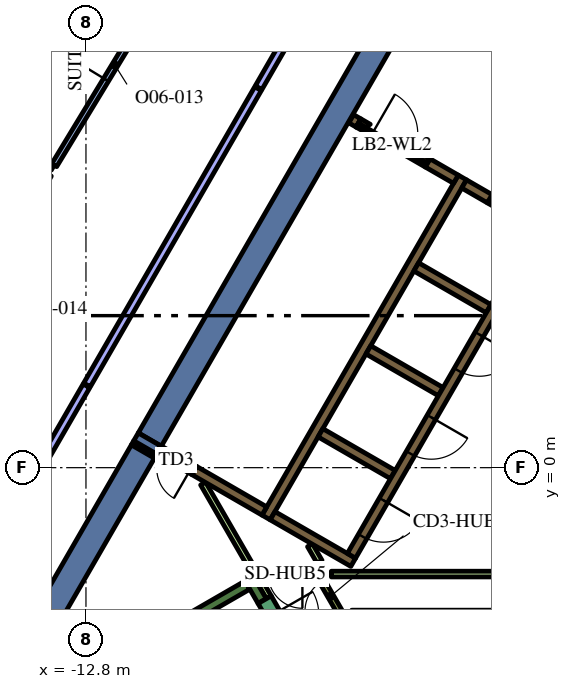
"""IFC4 building model, lengths in metres.
Left out: names, types, materials, properties, quantities, classifications, styles, units other than length and angle.
Written with IfcOpenShell. Run it as: python <this file> out.ifc"""

import sys

from ifc_helpers import new_model, si_unit, direction, frame, frame_2d, origin, place, context, subcontext, project, spatial, polyline, rectangle, outline, extrude, element, fill, save


model = new_model("IFC4")
c1 = context("Model", 3, precision=1e-05, world=origin(), true_north=direction((0.0, 1.0)))
c2 = subcontext(c1, "Body", "Model", "MODEL_VIEW")
j1 = project(units=[si_unit("LENGTHUNIT", "METRE"), si_unit("PLANEANGLEUNIT", "RADIAN")], contexts=[c1])
p1 = place(None, origin())
s1 = spatial("IfcSite", under=j1, at=p1, CompositionType="ELEMENT")
p2 = place(p1, origin())
s2 = spatial("IfcBuilding", under=s1, at=p2, CompositionType="ELEMENT")
p3 = place(p2, frame((0.0, 0.0, 210.0)))
s3 = spatial("IfcBuildingStorey", under=s2, at=p3, CompositionType="ELEMENT", Elevation=210.0)
p4 = place(p3, frame((-11.301, 0.426, 0.0), z_axis=(0.0, 0.0, 1.0), x_axis=(0.50111559984, 0.865380353138, 0.0)))
e1 = element("IfcWall", 1, at=p4, inside=s3, PredefinedType="SOLIDWALL", context=c2, shape_type="SweptSolid", body=[
    extrude(rectangle(XDim=0.121, YDim=0.7, at=frame_2d((0.061, 0.0))), origin(), (0.0, 0.0, 1.0), 4.2),
])
p5 = place(p3, frame((-15.321, -6.537, 0.0), z_axis=(0.0, 0.0, 1.0), x_axis=(0.500000268222, 0.866025248926, 0.0)))
e2 = element("IfcWall", 2, at=p5, inside=s3, PredefinedType="SOLIDWALL", context=c2, shape_type="SweptSolid", body=[
    extrude(rectangle(XDim=8.038, YDim=0.7, at=frame_2d((4.019, 0.0))), origin(), (0.0, 0.0, 1.0), 4.2),
])
p6 = place(p3, frame((-4.696, 11.867, 0.0), z_axis=(0.0, 0.0, 1.0), x_axis=(-0.500003726532, -0.866023252259, 0.0)))
e3 = element("IfcWall", 3, at=p6, inside=s3, PredefinedType="SOLIDWALL", context=c2, shape_type="SweptSolid", body=[
    extrude(rectangle(XDim=12.848, YDim=0.7, at=frame_2d((6.424, 0.0))), origin(), (0.0, 0.0, 1.0), 4.2),
])
p7 = place(p3, origin())
e4 = element("IfcWall", 4, at=p7, inside=s3, PredefinedType="SOLIDWALL", context=c2, shape_type="SweptSolid", body=[
    extrude(outline(polyline([(-11.543, 0.708), (-11.424, 0.914), (-10.843, 0.578), (-10.962, 0.372), (-11.543, 0.708)])), origin(), (0.0, 0.0, 1.0), 4.2),
])
p8 = place(p3, frame((-14.44, -6.49, 0.0), z_axis=(0.0, 0.0, 1.0), x_axis=(0.866022966069, 0.500004222222, 0.0)))
e5 = element("IfcWall", 5, at=p8, inside=s3, PredefinedType="SOLIDWALL", context=c2, shape_type="SweptSolid", body=[
    extrude(rectangle(XDim=6.8, YDim=0.25, at=frame_2d((3.4, 0.0))), origin(), (0.0, 0.0, 1.0), 4.2),
])
p9 = place(p3, frame((-8.163, -3.511, 0.0), z_axis=(0.0, 0.0, 1.0), x_axis=(-0.499994068514, 0.866028828302, 0.0)))
e6 = element("IfcWall", 6, at=p9, inside=s3, PredefinedType="SOLIDWALL", context=c2, shape_type="SweptSolid", body=[
    extrude(rectangle(XDim=0.674, YDim=0.25, at=frame_2d((0.337, 0.0))), origin(), (0.0, 0.0, 1.0), 4.2),
])
p10 = place(p3, frame((-8.06, -1.311, 0.0), z_axis=(0.0, 0.0, 1.0), x_axis=(0.50000273126, 0.866023826885, 0.0)))
e7 = element("IfcWall", 7, at=p10, inside=s3, PredefinedType="SOLIDWALL", context=c2, shape_type="SweptSolid", body=[
    extrude(rectangle(XDim=10.33, YDim=0.25, at=frame_2d((5.165, 0.0))), origin(), (0.0, 0.0, 1.0), 4.2),
])
p11 = place(p3, frame((-1.819, 6.87, 0.0), z_axis=(0.0, 0.0, 1.0), x_axis=(-0.866294599386, 0.499533449405, 0.0)))
e8 = element("IfcWall", 8, at=p11, inside=s3, PredefinedType="SOLIDWALL", context=c2, shape_type="SweptSolid", body=[
    extrude(rectangle(XDim=0.41, YDim=0.25, at=frame_2d((0.205, 0.0))), origin(), (0.0, 0.0, 1.0), 4.2),
])
p12 = place(p3, frame((-2.849, 7.465, 0.0), z_axis=(0.0, 0.0, 1.0), x_axis=(0.865955664968, -0.500120771724, 0.0)))
e9 = element("IfcWall", 9, at=p12, inside=s3, PredefinedType="SOLIDWALL", context=c2, shape_type="SweptSolid", body=[
    extrude(rectangle(XDim=0.778, YDim=0.25, at=frame_2d((0.389, 0.0))), origin(), (0.0, 0.0, 1.0), 4.2),
])
for number, where, z_axis, x_axis in (
    (10, (-2.204, 4.182, 0.0), (0.0, 0.0, 1.0), (-0.866, 0.5, 0.0)),
    (11, (-5.369, 3.1, 0.0), (0.0, 0.0, 1.0), (0.866, -0.5, 0.0)),
    (12, (-4.724, -0.182, 0.0), (0.0, 0.0, 1.0), (-0.866, 0.5, 0.0)),
):
    element("IfcWall", number, at=place(p3, frame(where, z_axis=z_axis, x_axis=x_axis)), inside=s3, PredefinedType="SOLIDWALL", context=c2, shape_type="SweptSolid", body=[
        extrude(rectangle(XDim=2.2, YDim=0.25, at=frame_2d((1.1, 0.0))), origin(), (0.0, 0.0, 1.0), 4.2),
    ])
p13 = place(p3, frame((-7.889, -1.265, 0.0), z_axis=(0.0, 0.0, 1.0), x_axis=(0.866057815567, -0.499943856944, 0.0)))
e13 = element("IfcWall", 13, at=p13, inside=s3, PredefinedType="SOLIDWALL", context=c2, shape_type="SweptSolid", body=[
    extrude(rectangle(XDim=2.45, YDim=0.25, at=frame_2d((1.225, 0.0))), origin(), (0.0, 0.0, 1.0), 4.2),
])
p14 = place(p3, frame((-9.95, -0.075, 0.0), z_axis=(0.0, 0.0, 1.0), x_axis=(0.865962177421, -0.500109495288, 0.0)))
e14 = element("IfcWall", 14, at=p14, inside=s3, PredefinedType="SOLIDWALL", context=c2, shape_type="SweptSolid", body=[
    extrude(rectangle(XDim=2.129, YDim=0.25, at=frame_2d((1.065, 0.0))), origin(), (0.0, 0.0, 1.0), 4.2),
])
p15 = place(p3, frame((-5.629, 9.07, 0.0), z_axis=(0.0, 0.0, 1.0), x_axis=(-0.866185586049, 0.49972245349, 0.0)))
e15 = element("IfcWall", 15, at=p15, inside=s3, PredefinedType="SOLIDWALL", context=c2, shape_type="SweptSolid", body=[
    extrude(rectangle(XDim=0.22, YDim=0.25, at=frame_2d((0.11, 0.0))), origin(), (0.0, 0.0, 1.0), 4.2),
])
p16 = place(p3, frame((-3.809, 8.019, 0.0), z_axis=(0.0, 0.0, 1.0), x_axis=(0.866010229787, -0.500026281214, 0.0)))
e16 = element("IfcWall", 16, at=p16, inside=s3, PredefinedType="SOLIDWALL", context=c2, shape_type="SweptSolid", body=[
    extrude(rectangle(XDim=0.858, YDim=0.25, at=frame_2d((0.429, 0.0))), origin(), (0.0, 0.0, 1.0), 4.2),
])
e17 = element("IfcWall", 17, at=p7, inside=s3, PredefinedType="SOLIDWALL", context=c2, shape_type="SweptSolid", body=[
    extrude(outline(polyline([(-3.748, 8.128), (-3.813, 8.015), (-4.027, 8.139), (-4.017, 8.156), (-4.008, 8.173), (-4.0, 8.192), (-3.995, 8.21), (-3.991, 8.23), (-3.99, 8.25), (-3.99, 8.268), (-3.748, 8.128)])), origin(), (0.0, 0.0, 1.0), 4.2),
])
e18 = element("IfcWall", 18, at=p7, inside=s3, PredefinedType="SOLIDWALL", context=c2, shape_type="SweptSolid", body=[
    extrude(outline(polyline([(-5.689, 8.96), (-5.69, 8.961), (-5.565, 9.177), (-5.319, 9.035), (-5.335, 9.026), (-5.351, 9.015), (-5.366, 9.002), (-5.379, 8.988), (-5.392, 8.972), (-5.402, 8.956), (-5.412, 8.939), (-5.629, 9.064), (-5.629, 9.064), (-5.689, 8.96)])), origin(), (0.0, 0.0, 1.0), 4.2),
])
p17 = place(p3, frame((-9.718, -0.417, 0.0), z_axis=(0.0, 0.0, 1.0), x_axis=(0.499966538646, -0.866044721844, 0.0)))
e19 = element("IfcWall", 19, at=p17, inside=s3, PredefinedType="PARTITIONING", context=c2, shape_type="SweptSolid", body=[
    extrude(rectangle(XDim=2.511, YDim=0.15, at=frame_2d((1.255, 0.0))), origin(), (0.0, 0.0, 1.0), 3.45),
])
p18 = place(p3, frame((1.438, -2.8, 0.0), z_axis=(0.0, 0.0, 1.0), x_axis=(-1.0, 0.0, 0.0)))
e20 = element("IfcWall", 20, at=p18, inside=s3, PredefinedType="PARTITIONING", context=c2, shape_type="SweptSolid", body=[
    extrude(rectangle(XDim=7.781, YDim=0.15, at=frame_2d((3.891, 0.0))), origin(), (0.0, 0.0, 1.0), 3.45),
])
p19 = place(p3, frame((-6.653, -2.477, 0.0), z_axis=(0.0, 0.0, 1.0), x_axis=(-0.500002592159, 0.866023907196, 0.0)))
e21 = element("IfcWall", 21, at=p19, inside=s3, PredefinedType="PARTITIONING", context=c2, shape_type="SweptSolid", body=[
    extrude(rectangle(XDim=0.503, YDim=0.15, at=frame_2d((0.251, 0.0))), origin(), (0.0, 0.0, 1.0), 3.45),
])
p20 = place(p3, frame((-7.99, -3.412, 0.0), z_axis=(0.0, 0.0, 1.0), x_axis=(-0.499858525911, 0.866107068482, 0.0)))
e22 = element("IfcWall", 22, at=p20, inside=s3, PredefinedType="PARTITIONING", context=c2, shape_type="SweptSolid", body=[
    extrude(rectangle(XDim=0.466, YDim=0.15, at=frame_2d((0.233, 0.0))), origin(), (0.0, 0.0, 1.0), 3.45),
])
p21 = place(p3, frame((-0.898, 6.194, 0.0), z_axis=(0.0, 0.0, 1.0), x_axis=(-0.499996202215, -0.866027596426, 0.0)))
e23 = element("IfcWall", 23, at=p21, inside=s3, PredefinedType="SOLIDWALL", context=c2, shape_type="SweptSolid", body=[
    extrude(rectangle(XDim=9.83, YDim=0.25, at=frame_2d((4.915, 0.0))), origin(), (0.0, 0.0, 1.0), 4.2),
])
p22 = place(p21, frame((0.585, 0.0, 0.0)))
e24 = element("IfcOpeningElement", 24, at=p22, cuts=e23, PredefinedType="OPENING", context=c2, shape_type="SweptSolid", body=[
    extrude(rectangle(XDim=1.1, YDim=2.1, at=frame_2d((0.55, 1.05))), frame((0.0, 0.135, 0.0), z_axis=(0.0, -1.0, 0.0), x_axis=(1.0, 0.0, 0.0)), (0.0, 0.0, 1.0), 0.27),
])
p23 = place(p21, frame((3.105, 0.0, 0.0)))
e25 = element("IfcOpeningElement", 25, at=p23, cuts=e23, PredefinedType="OPENING", context=c2, shape_type="SweptSolid", body=[
    extrude(rectangle(XDim=1.1, YDim=2.1, at=frame_2d((0.55, 1.05))), frame((0.0, 0.135, 0.0), z_axis=(0.0, -1.0, 0.0), x_axis=(1.0, 0.0, 0.0)), (0.0, 0.0, 1.0), 0.27),
])
p24 = place(p21, frame((5.625, 0.0, 0.0)))
e26 = element("IfcOpeningElement", 26, at=p24, cuts=e23, PredefinedType="OPENING", context=c2, shape_type="SweptSolid", body=[
    extrude(rectangle(XDim=1.1, YDim=2.1, at=frame_2d((0.55, 1.05))), frame((0.0, 0.135, 0.0), z_axis=(0.0, -1.0, 0.0), x_axis=(1.0, 0.0, 0.0)), (0.0, 0.0, 1.0), 0.27),
])
p25 = place(p21, frame((8.145, 0.0, 0.0)))
e27 = element("IfcOpeningElement", 27, at=p25, cuts=e23, PredefinedType="OPENING", context=c2, shape_type="SweptSolid", body=[
    extrude(rectangle(XDim=1.1, YDim=2.1, at=frame_2d((0.55, 1.05))), frame((0.0, 0.135, 0.0), z_axis=(0.0, -1.0, 0.0), x_axis=(1.0, 0.0, 0.0)), (0.0, 0.0, 1.0), 0.27),
])
p26 = place(p3, frame((-8.098, -3.474, 0.0), z_axis=(0.0, 0.0, 1.0), x_axis=(0.49994051562, -0.866059744384, 0.0)))
e28 = element("IfcWall", 28, at=p26, inside=s3, PredefinedType="SOLIDWALL", context=c2, shape_type="SweptSolid", body=[
    extrude(rectangle(XDim=2.1, YDim=0.4, at=frame_2d((1.05, 0.0))), origin(), (0.0, 0.0, 1.0), 4.2),
])
p27 = place(p26, frame((0.45, 0.0, 0.0)))
e29 = element("IfcOpeningElement", 29, at=p27, cuts=e28, PredefinedType="OPENING", context=c2, shape_type="SweptSolid", body=[
    extrude(rectangle(XDim=1.2, YDim=2.1, at=frame_2d((0.6, 1.05))), frame((0.0, 0.21, 0.0), z_axis=(0.0, -1.0, 0.0), x_axis=(1.0, 0.0, 0.0)), (0.0, 0.0, 1.0), 0.42),
])
p28 = place(p3, frame((-5.861, -4.248, 0.0), z_axis=(0.0, 0.0, 1.0), x_axis=(-0.500043646338, 0.866000203093, 0.0)))
e30 = element("IfcWall", 30, at=p28, inside=s3, PredefinedType="PARTITIONING", context=c2, shape_type="SweptSolid", body=[
    extrude(rectangle(XDim=1.93, YDim=0.15, at=frame_2d((0.965, 0.0))), origin(), (0.0, 0.0, 1.0), 4.2),
])
p29 = place(p28, frame((0.55, 0.0, 0.0)))
e31 = element("IfcOpeningElement", 31, at=p29, cuts=e30, PredefinedType="OPENING", context=c2, shape_type="SweptSolid", body=[
    extrude(rectangle(XDim=0.9, YDim=2.1, at=frame_2d((0.45, 1.05))), frame((0.0, 0.085, 0.0), z_axis=(0.0, -1.0, 0.0), x_axis=(1.0, 0.0, 0.0)), (0.0, 0.0, 1.0), 0.17),
])
p30 = place(p3, frame((-5.659, 9.012, 0.0), z_axis=(0.0, 0.0, 1.0), x_axis=(0.866009402589, -0.500027713859, 0.0)))
e32 = element("IfcWall", 32, at=p30, inside=s3, PredefinedType="PARTITIONING", context=c2, shape_type="SweptSolid", body=[
    extrude(rectangle(XDim=2.1, YDim=0.12, at=frame_2d((1.05, 0.0))), origin(), (0.0, 0.0, 1.0), 3.45),
])
p31 = place(p30, frame((0.45, 0.0, 0.0)))
e33 = element("IfcOpeningElement", 33, at=p31, cuts=e32, PredefinedType="OPENING", context=c2, shape_type="SweptSolid", body=[
    extrude(rectangle(XDim=1.2, YDim=2.1, at=frame_2d((0.6, 1.05))), frame((0.0, 0.07, 0.0), z_axis=(0.0, -1.0, 0.0), x_axis=(1.0, 0.0, 0.0)), (0.0, 0.0, 1.0), 0.14),
])
p32 = place(p3, frame((-6.655, -2.8, 0.0), z_axis=(0.0, 0.0, 1.0), x_axis=(-1.0, 0.0, 0.0)))
e34 = element("IfcWall", 34, at=p32, inside=s3, PredefinedType="PARTITIONING", context=c2, shape_type="SweptSolid", body=[
    extrude(rectangle(XDim=1.8, YDim=0.15, at=frame_2d((0.9, 0.0))), origin(), (0.0, 0.0, 1.0), 3.45),
])
p33 = place(p32, frame((0.45, 0.0, 0.0)))
e35 = element("IfcOpeningElement", 35, at=p33, cuts=e34, PredefinedType="OPENING", context=c2, shape_type="SweptSolid", body=[
    extrude(rectangle(XDim=0.9, YDim=2.1, at=frame_2d((0.45, 1.05))), frame((0.0, 0.085, 0.0), z_axis=(0.0, -1.0, 0.0), x_axis=(1.0, 0.0, 0.0)), (0.0, 0.0, 1.0), 0.17),
])
p34 = place(p3, frame((-9.95, -0.075, 0.0), z_axis=(0.0, 0.0, 1.0), x_axis=(-0.865952669392, 0.500125958508, 0.0)))
e36 = element("IfcWall", 36, at=p34, inside=s3, PredefinedType="SOLIDWALL", context=c2, shape_type="SweptSolid", body=[
    extrude(rectangle(XDim=1.1, YDim=0.25, at=frame_2d((0.55, 0.0))), origin(), (0.0, 0.0, 1.0), 4.2),
])
p35 = place(p34, frame((0.1, 0.0, 0.0)))
e37 = element("IfcOpeningElement", 37, at=p35, cuts=e36, PredefinedType="OPENING", context=c2, shape_type="SweptSolid", body=[
    extrude(rectangle(XDim=0.9, YDim=2.1, at=frame_2d((0.45, 1.05))), frame((0.0, 0.135, 0.0), z_axis=(0.0, -1.0, 0.0), x_axis=(1.0, 0.0, 0.0)), (0.0, 0.0, 1.0), 0.27),
])
p36 = place(p3, frame((-13.674, 7.895, 0.0), z_axis=(0.0, 0.0, 1.0), x_axis=(-0.866032537582, 0.499987643696, 0.0)))
e38 = element("IfcWall", 38, at=p36, inside=s3, PredefinedType="PARTITIONING", context=c2, shape_type="SweptSolid", body=[
    extrude(rectangle(XDim=3.241, YDim=0.15, at=frame_2d((1.62, 0.0))), origin(), (0.0, 0.0, 1.0), 3.45),
])
p37 = place(p3, frame((-13.635, 7.959, 0.0), z_axis=(0.0, 0.0, 1.0), x_axis=(0.518788941184, 0.854902353784, 0.0)))
e39 = element("IfcWall", 39, at=p37, inside=s3, PredefinedType="PARTITIONING", context=c2, shape_type="SweptSolid", body=[
    extrude(rectangle(XDim=6.129, YDim=0.15, at=frame_2d((3.064, 0.0))), origin(), (0.0, 0.0, 1.0), 3.45),
])
p38 = place(p37, frame((2.629, 0.0, 0.0)))
e40 = element("IfcOpeningElement", 40, at=p38, cuts=e39, PredefinedType="OPENING", context=c2, shape_type="SweptSolid", body=[
    extrude(rectangle(XDim=0.9, YDim=2.1, at=frame_2d((0.45, 1.05))), frame((0.0, 0.085, 0.0), z_axis=(0.0, -1.0, 0.0), x_axis=(1.0, 0.0, 0.0)), (0.0, 0.0, 1.0), 0.17),
])
p39 = place(p3, frame((-8.272, 9.972, 0.0), z_axis=(0.0, 0.0, 1.0), x_axis=(-0.5000018851, -0.866024315419, 0.0)))
e41 = element("IfcWall", 41, at=p39, inside=s3, PredefinedType="PARTITIONING", context=c2, shape_type="SweptSolid", body=[
    extrude(rectangle(XDim=9.0, YDim=0.2, at=frame_2d((4.5, 0.0))), origin(), (0.0, 0.0, 1.0), 3.45),
])
p40 = place(p3, frame((-12.787, 2.152, 0.0), z_axis=(0.0, 0.0, 1.0), x_axis=(-0.50000660679, -0.866021589319, 0.0)))
e42 = element("IfcWall", 42, at=p40, inside=s3, PredefinedType="PARTITIONING", context=c2, shape_type="SweptSolid", body=[
    extrude(rectangle(XDim=9.817, YDim=0.2, at=frame_2d((4.909, 0.0))), origin(), (0.0, 0.0, 1.0), 3.45),
])
p41 = place(p40, frame((4.4, 0.0, 0.0)))
e43 = element("IfcOpeningElement", 43, at=p41, cuts=e42, PredefinedType="OPENING", context=c2, shape_type="SweptSolid", body=[
    extrude(rectangle(XDim=1.0, YDim=2.1, at=frame_2d((0.5, 1.05))), frame((0.0, 0.11, 0.0), z_axis=(0.0, -1.0, 0.0), x_axis=(1.0, 0.0, 0.0)), (0.0, 0.0, 1.0), 0.22),
])
p42 = place(p3, frame((-4.148, 17.115, 0.0), z_axis=(0.0, 0.0, 1.0), x_axis=(-0.499983057696, -0.866035185207, 0.0)))
e44 = element("IfcWall", 44, at=p42, inside=s3, PredefinedType="PARTITIONING", context=c2, shape_type="SweptSolid", body=[
    extrude(rectangle(XDim=8.218, YDim=0.2, at=frame_2d((4.109, 0.0))), origin(), (0.0, 0.0, 1.0), 3.45),
])
p43 = place(p23, origin())
e45 = element("IfcDoor", 45, at=p43, inside=s3, OperationType="DOUBLE_DOOR_SLIDING", PredefinedType="DOOR", context=c2, shape_type="SweptSolid", body=[
    extrude(rectangle(XDim=1.1, YDim=2.1, at=frame_2d((0.55, 1.05))), frame((0.0, 0.025, 0.0), z_axis=(0.0, -1.0, 0.0), x_axis=(1.0, 0.0, 0.0)), (0.0, 0.0, 1.0), 0.05),
])
fill(e25, e45)
p44 = place(p24, origin())
e46 = element("IfcDoor", 46, at=p44, inside=s3, OperationType="DOUBLE_DOOR_SLIDING", PredefinedType="DOOR", context=c2, shape_type="SweptSolid", body=[
    extrude(rectangle(XDim=1.1, YDim=2.1, at=frame_2d((0.55, 1.05))), frame((0.0, 0.025, 0.0), z_axis=(0.0, -1.0, 0.0), x_axis=(1.0, 0.0, 0.0)), (0.0, 0.0, 1.0), 0.05),
])
fill(e26, e46)
p45 = place(p25, origin())
e47 = element("IfcDoor", 47, at=p45, inside=s3, OperationType="DOUBLE_DOOR_SLIDING", PredefinedType="DOOR", context=c2, shape_type="SweptSolid", body=[
    extrude(rectangle(XDim=1.1, YDim=2.1, at=frame_2d((0.55, 1.05))), frame((0.0, 0.025, 0.0), z_axis=(0.0, -1.0, 0.0), x_axis=(1.0, 0.0, 0.0)), (0.0, 0.0, 1.0), 0.05),
])
fill(e27, e47)
p46 = place(p29, origin())
e48 = element("IfcDoor", 48, at=p46, inside=s3, OperationType="SINGLE_SWING_LEFT", PredefinedType="DOOR", context=c2, shape_type="SweptSolid", body=[
    extrude(rectangle(XDim=0.9, YDim=2.1, at=frame_2d((0.45, 1.05))), frame((0.0, 0.025, 0.0), z_axis=(0.0, -1.0, 0.0), x_axis=(1.0, 0.0, 0.0)), (0.0, 0.0, 1.0), 0.05),
])
fill(e31, e48)
p47 = place(p31, origin())
e49 = element("IfcDoor", 49, at=p47, inside=s3, OperationType="SINGLE_SWING_LEFT", PredefinedType="DOOR", context=c2, shape_type="SweptSolid", body=[
    extrude(rectangle(XDim=1.2, YDim=2.1, at=frame_2d((0.6, 1.05))), frame((0.0, 0.025, 0.0), z_axis=(0.0, -1.0, 0.0), x_axis=(1.0, 0.0, 0.0)), (0.0, 0.0, 1.0), 0.05),
])
fill(e33, e49)
p48 = place(p33, origin())
e50 = element("IfcDoor", 50, at=p48, inside=s3, OperationType="SINGLE_SWING_LEFT", PredefinedType="DOOR", context=c2, shape_type="SweptSolid", body=[
    extrude(rectangle(XDim=0.9, YDim=2.1, at=frame_2d((0.45, 1.05))), frame((0.0, 0.025, 0.0), z_axis=(0.0, -1.0, 0.0), x_axis=(1.0, 0.0, 0.0)), (0.0, 0.0, 1.0), 0.05),
])
fill(e35, e50)
p49 = place(p35, origin())
e51 = element("IfcDoor", 51, at=p49, inside=s3, OperationType="SINGLE_SWING_LEFT", PredefinedType="DOOR", context=c2, shape_type="SweptSolid", body=[
    extrude(rectangle(XDim=0.9, YDim=2.1, at=frame_2d((0.45, 1.05))), frame((0.0, 0.025, 0.0), z_axis=(0.0, -1.0, 0.0), x_axis=(1.0, 0.0, 0.0)), (0.0, 0.0, 1.0), 0.05),
])
fill(e37, e51)
p50 = place(p38, origin())
e52 = element("IfcDoor", 52, at=p50, inside=s3, OperationType="SINGLE_SWING_RIGHT", PredefinedType="DOOR", context=c2, shape_type="SweptSolid", body=[
    extrude(rectangle(XDim=0.9, YDim=2.1, at=frame_2d((0.45, 1.05))), frame((0.0, 0.025, 0.0), z_axis=(0.0, -1.0, 0.0), x_axis=(1.0, 0.0, 0.0)), (0.0, 0.0, 1.0), 0.05),
])
fill(e40, e52)
save(model, sys.argv[1])
